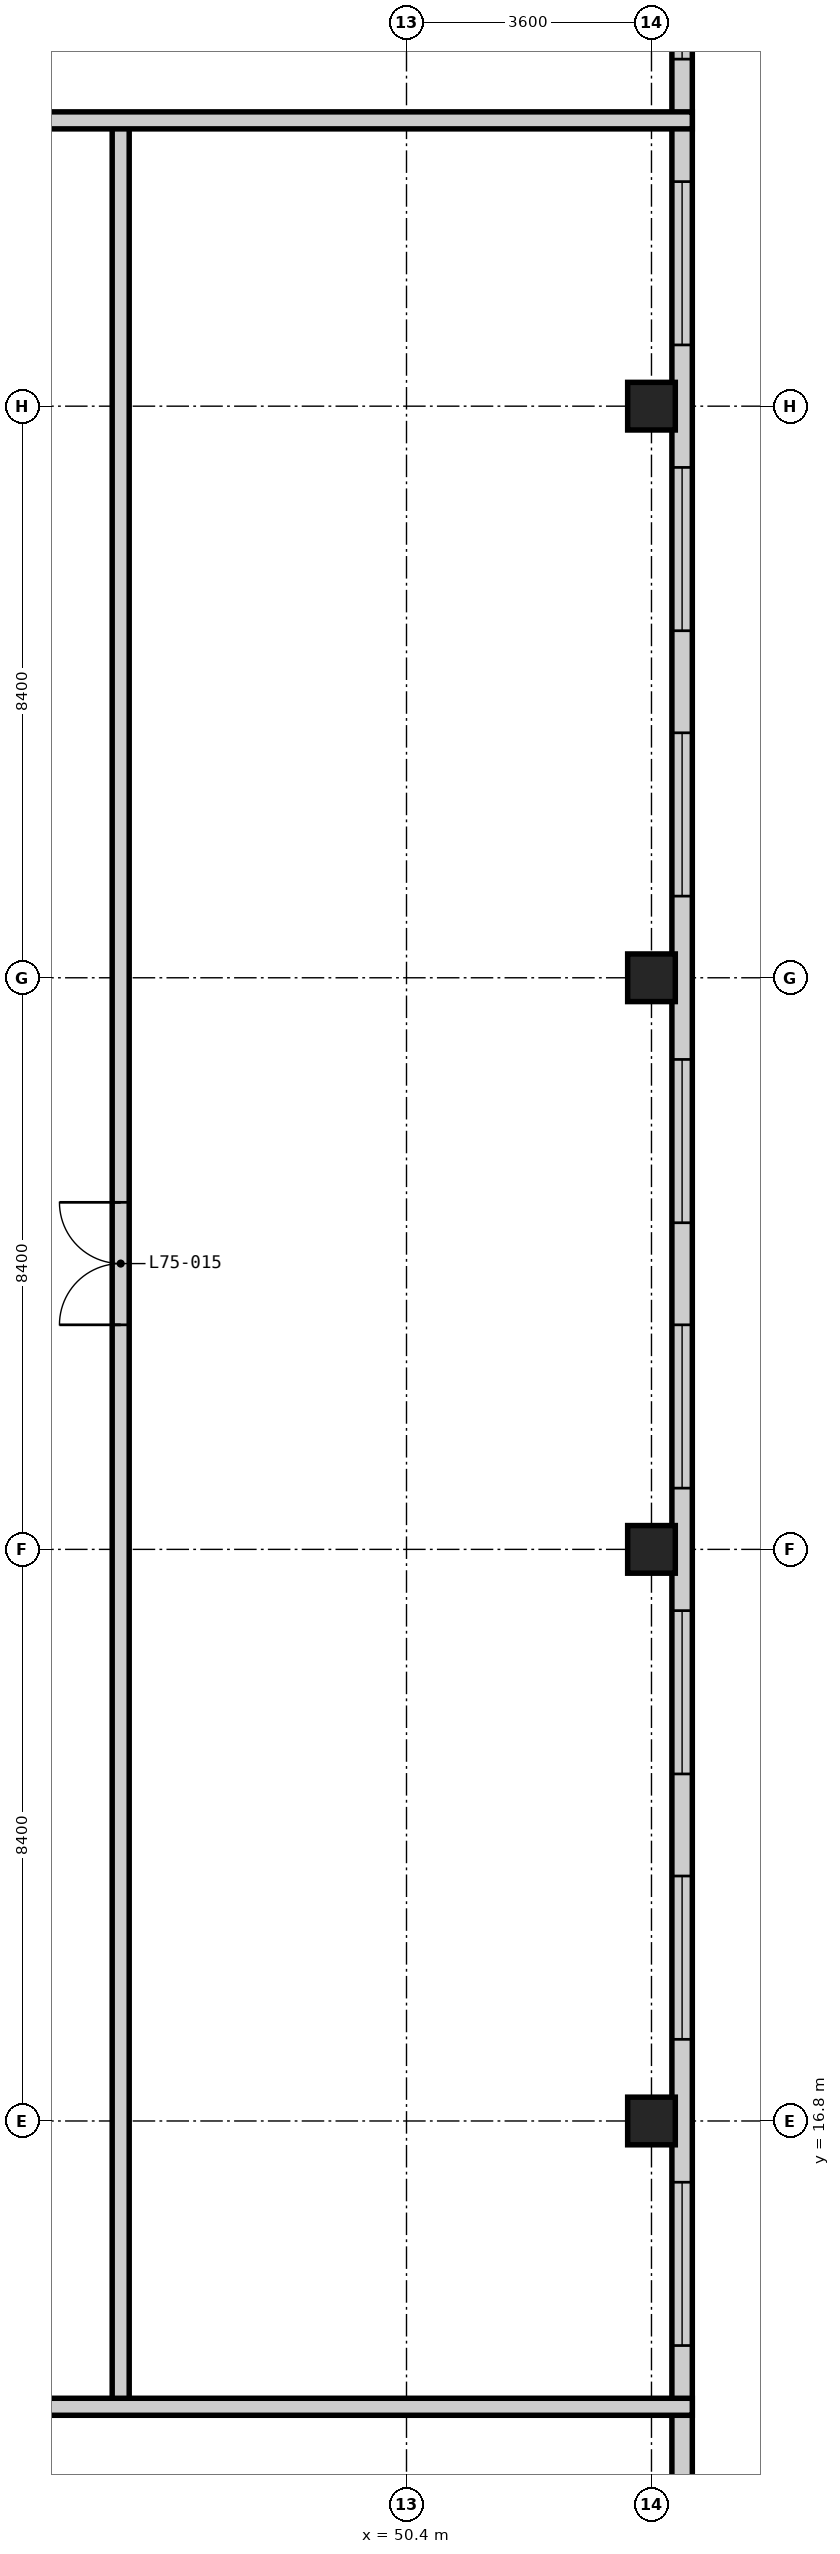
"""IFC4 building model, lengths in metres.
Left out: names, types, materials, properties, quantities, classifications, styles, units other than length and angle.
Written with IfcOpenShell. Run it as: python <this file> out.ifc"""

import sys

from ifc_helpers import new_model, si_unit, direction, frame, frame_2d, origin, origin_2d, place, context, subcontext, project, spatial, polyline, rectangle, hollow_rectangle, outline, extrude, element, fill, save


model = new_model("IFC4")
c1 = context("Model", 3, precision=1e-05, world=origin(), true_north=direction((0.0, 1.0)))
c2 = subcontext(c1, "Body", "Model", "MODEL_VIEW")
j1 = project(units=[si_unit("LENGTHUNIT", "METRE"), si_unit("PLANEANGLEUNIT", "RADIAN")], contexts=[c1])
p1 = place(None, origin())
s1 = spatial("IfcSite", under=j1, at=p1, CompositionType="ELEMENT")
p2 = place(p1, origin())
s2 = spatial("IfcBuilding", under=s1, at=p2, CompositionType="ELEMENT")
p3 = place(p2, frame((0.0, 0.0, 293.6)))
s3 = spatial("IfcBuildingStorey", under=s2, at=p3, CompositionType="ELEMENT", Elevation=293.6)
for number, where, z_axis, x_axis in (
    (1, (54.0, 16.8, -0.35), (0.0, 0.0, 1.0), (1.0, 0.0, 0.0)),
    (2, (54.0, 25.2, -0.35), (0.0, 0.0, 1.0), (1.0, 0.0, 0.0)),
    (3, (54.0, 33.6, -0.35), (0.0, 0.0, 1.0), (1.0, 0.0, 0.0)),
    (4, (54.0, 42.0, -0.35), (0.0, 0.0, 1.0), (1.0, 0.0, 0.0)),
):
    element("IfcColumn", number, at=place(p3, frame(where, z_axis=z_axis, x_axis=x_axis)), inside=s3, PredefinedType="COLUMN", context=c2, shape_type="SweptSolid", body=[
        extrude(hollow_rectangle(XDim=0.7, YDim=0.7, WallThickness=0.06, at=origin_2d()), origin(), (0.0, 0.0, 1.0), 14.972),
    ])
p4 = place(p3, frame((54.45, 6.9, 0.0), z_axis=(0.0, 0.0, 1.0), x_axis=(0.0, 1.0, 0.0)))
e5 = element("IfcWall", 5, at=p4, inside=s3, PredefinedType="SOLIDWALL", context=c2, shape_type="SweptSolid", body=[
    extrude(outline(polyline([(0.0, 0.0), (45.0, 0.0), (45.0, 15.455), (0.0, 15.455), (0.0, 0.0)])), frame((0.0, 0.15, 0.0), z_axis=(0.0, -1.0, 0.0), x_axis=(1.0, 0.0, 0.0)), (0.0, 0.0, 1.0), 0.3),
])
p5 = place(p4, frame((0.9, 0.0, 0.6)))
e6 = element("IfcOpeningElement", 6, at=p5, cuts=e5, PredefinedType="OPENING", context=c2, shape_type="SweptSolid", body=[
    extrude(rectangle(XDim=2.4, YDim=1.5, at=frame_2d((1.2, 0.75))), frame((0.0, 0.16, 0.0), z_axis=(0.0, -1.0, 0.0), x_axis=(1.0, 0.0, 0.0)), (0.0, 0.0, 1.0), 0.32),
])
p6 = place(p4, frame((6.6, 0.0, 0.6)))
e7 = element("IfcOpeningElement", 7, at=p6, cuts=e5, PredefinedType="OPENING", context=c2, shape_type="SweptSolid", body=[
    extrude(rectangle(XDim=2.4, YDim=1.5, at=frame_2d((1.2, 0.75))), frame((0.0, 0.16, 0.0), z_axis=(0.0, -1.0, 0.0), x_axis=(1.0, 0.0, 0.0)), (0.0, 0.0, 1.0), 0.32),
])
p7 = place(p4, frame((11.1, 0.0, 0.6)))
e8 = element("IfcOpeningElement", 8, at=p7, cuts=e5, PredefinedType="OPENING", context=c2, shape_type="SweptSolid", body=[
    extrude(rectangle(XDim=2.4, YDim=1.5, at=frame_2d((1.2, 0.75))), frame((0.0, 0.16, 0.0), z_axis=(0.0, -1.0, 0.0), x_axis=(1.0, 0.0, 0.0)), (0.0, 0.0, 1.0), 0.32),
])
p8 = place(p4, frame((15.0, 0.0, 0.6)))
e9 = element("IfcOpeningElement", 9, at=p8, cuts=e5, PredefinedType="OPENING", context=c2, shape_type="SweptSolid", body=[
    extrude(rectangle(XDim=2.4, YDim=1.5, at=frame_2d((1.2, 0.75))), frame((0.0, 0.16, 0.0), z_axis=(0.0, -1.0, 0.0), x_axis=(1.0, 0.0, 0.0)), (0.0, 0.0, 1.0), 0.32),
])
p9 = place(p4, frame((19.2, 0.0, 0.6)))
e10 = element("IfcOpeningElement", 10, at=p9, cuts=e5, PredefinedType="OPENING", context=c2, shape_type="SweptSolid", body=[
    extrude(rectangle(XDim=2.4, YDim=1.5, at=frame_2d((1.2, 0.75))), frame((0.0, 0.16, 0.0), z_axis=(0.0, -1.0, 0.0), x_axis=(1.0, 0.0, 0.0)), (0.0, 0.0, 1.0), 0.32),
])
p10 = place(p4, frame((23.1, 0.0, 0.6)))
e11 = element("IfcOpeningElement", 11, at=p10, cuts=e5, PredefinedType="OPENING", context=c2, shape_type="SweptSolid", body=[
    extrude(rectangle(XDim=2.4, YDim=1.5, at=frame_2d((1.2, 0.75))), frame((0.0, 0.16, 0.0), z_axis=(0.0, -1.0, 0.0), x_axis=(1.0, 0.0, 0.0)), (0.0, 0.0, 1.0), 0.32),
])
p11 = place(p4, frame((27.9, 0.0, 0.6)))
e12 = element("IfcOpeningElement", 12, at=p11, cuts=e5, PredefinedType="OPENING", context=c2, shape_type="SweptSolid", body=[
    extrude(rectangle(XDim=2.4, YDim=1.5, at=frame_2d((1.2, 0.75))), frame((0.0, 0.16, 0.0), z_axis=(0.0, -1.0, 0.0), x_axis=(1.0, 0.0, 0.0)), (0.0, 0.0, 1.0), 0.32),
])
p12 = place(p4, frame((31.8, 0.0, 0.6)))
e13 = element("IfcOpeningElement", 13, at=p12, cuts=e5, PredefinedType="OPENING", context=c2, shape_type="SweptSolid", body=[
    extrude(rectangle(XDim=2.4, YDim=1.5, at=frame_2d((1.2, 0.75))), frame((0.0, 0.16, 0.0), z_axis=(0.0, -1.0, 0.0), x_axis=(1.0, 0.0, 0.0)), (0.0, 0.0, 1.0), 0.32),
])
p13 = place(p4, frame((36.0, 0.0, 0.6)))
e14 = element("IfcOpeningElement", 14, at=p13, cuts=e5, PredefinedType="OPENING", context=c2, shape_type="SweptSolid", body=[
    extrude(rectangle(XDim=2.4, YDim=1.5, at=frame_2d((1.2, 0.75))), frame((0.0, 0.16, 0.0), z_axis=(0.0, -1.0, 0.0), x_axis=(1.0, 0.0, 0.0)), (0.0, 0.0, 1.0), 0.32),
])
p14 = place(p4, frame((40.2, 0.0, 0.6)))
e15 = element("IfcOpeningElement", 15, at=p14, cuts=e5, PredefinedType="OPENING", context=c2, shape_type="SweptSolid", body=[
    extrude(rectangle(XDim=2.4, YDim=1.5, at=frame_2d((1.2, 0.75))), frame((0.0, 0.16, 0.0), z_axis=(0.0, -1.0, 0.0), x_axis=(1.0, 0.0, 0.0)), (0.0, 0.0, 1.0), 0.32),
])
p15 = place(p3, frame((46.2, 12.6, 0.0), z_axis=(0.0, 0.0, 1.0), x_axis=(0.0, 1.0, 0.0)))
e16 = element("IfcWall", 16, at=p15, inside=s3, PredefinedType="PARTITIONING", context=c2, shape_type="SweptSolid", body=[
    extrude(outline(polyline([(0.0, 0.0), (33.6, 0.0), (33.6, 13.244), (0.0, 13.244), (0.0, 0.0)])), frame((0.0, 0.125, 0.0), z_axis=(0.0, -1.0, 0.0), x_axis=(1.0, 0.0, 0.0)), (0.0, 0.0, 1.0), 0.25),
])
p16 = place(p15, frame((15.9, 0.0, 0.0)))
e17 = element("IfcOpeningElement", 17, at=p16, cuts=e16, PredefinedType="OPENING", context=c2, shape_type="SweptSolid", body=[
    extrude(rectangle(XDim=1.8, YDim=2.4, at=frame_2d((0.9, 1.2))), frame((0.0, 0.135, 0.0), z_axis=(0.0, -1.0, 0.0), x_axis=(1.0, 0.0, 0.0)), (0.0, 0.0, 1.0), 0.27),
])
p17 = place(p3, frame((25.2, 12.6, 0.0), z_axis=(0.0, 0.0, 1.0), x_axis=(1.0, 0.0, 0.0)))
e18 = element("IfcWall", 18, at=p17, inside=s3, PredefinedType="PARTITIONING", context=c2, shape_type="SweptSolid", body=[
    extrude(outline(polyline([(0.0, 0.0), (29.4, 0.0), (29.4, 15.495), (0.0, 7.617), (0.0, 0.0)])), frame((0.0, 0.125, 0.0), z_axis=(0.0, -1.0, 0.0), x_axis=(1.0, 0.0, 0.0)), (0.0, 0.0, 1.0), 0.25),
])
p18 = place(p17, frame((9.6, 0.0, 0.0)))
e19 = element("IfcOpeningElement", 19, at=p18, cuts=e18, PredefinedType="OPENING", context=c2, shape_type="SweptSolid", body=[
    extrude(rectangle(XDim=1.8, YDim=2.4, at=frame_2d((0.9, 1.2))), frame((0.0, 0.135, 0.0), z_axis=(0.0, -1.0, 0.0), x_axis=(1.0, 0.0, 0.0)), (0.0, 0.0, 1.0), 0.27),
])
p19 = place(p3, frame((25.2, 46.2, 0.0), z_axis=(0.0, 0.0, 1.0), x_axis=(1.0, 0.0, 0.0)))
e20 = element("IfcWall", 20, at=p19, inside=s3, PredefinedType="PARTITIONING", context=c2, shape_type="SweptSolid", body=[
    extrude(outline(polyline([(0.0, 0.0), (29.4, 0.0), (29.4, 15.495), (0.0, 7.617), (0.0, 0.0)])), frame((0.0, 0.125, 0.0), z_axis=(0.0, -1.0, 0.0), x_axis=(1.0, 0.0, 0.0)), (0.0, 0.0, 1.0), 0.25),
])
p20 = place(p19, frame((9.6, 0.0, 0.0)))
e21 = element("IfcOpeningElement", 21, at=p20, cuts=e20, PredefinedType="OPENING", context=c2, shape_type="SweptSolid", body=[
    extrude(rectangle(XDim=1.8, YDim=2.4, at=frame_2d((0.9, 1.2))), frame((0.0, 0.135, 0.0), z_axis=(0.0, -1.0, 0.0), x_axis=(1.0, 0.0, 0.0)), (0.0, 0.0, 1.0), 0.27),
])
p21 = place(p6, origin())
e22 = element("IfcWindow", 22, at=p21, inside=s3, PartitioningType="SINGLE_PANEL", PredefinedType="WINDOW", context=c2, shape_type="SweptSolid", body=[
    extrude(rectangle(XDim=2.4, YDim=1.5, at=frame_2d((1.2, 0.75))), frame((0.0, 0.03, 0.0), z_axis=(0.0, -1.0, 0.0), x_axis=(1.0, 0.0, 0.0)), (0.0, 0.0, 1.0), 0.06),
])
fill(e7, e22)
p22 = place(p7, origin())
e23 = element("IfcWindow", 23, at=p22, inside=s3, PartitioningType="SINGLE_PANEL", PredefinedType="WINDOW", context=c2, shape_type="SweptSolid", body=[
    extrude(rectangle(XDim=2.4, YDim=1.5, at=frame_2d((1.2, 0.75))), frame((0.0, 0.03, 0.0), z_axis=(0.0, -1.0, 0.0), x_axis=(1.0, 0.0, 0.0)), (0.0, 0.0, 1.0), 0.06),
])
fill(e8, e23)
p23 = place(p8, origin())
e24 = element("IfcWindow", 24, at=p23, inside=s3, PartitioningType="SINGLE_PANEL", PredefinedType="WINDOW", context=c2, shape_type="SweptSolid", body=[
    extrude(rectangle(XDim=2.4, YDim=1.5, at=frame_2d((1.2, 0.75))), frame((0.0, 0.03, 0.0), z_axis=(0.0, -1.0, 0.0), x_axis=(1.0, 0.0, 0.0)), (0.0, 0.0, 1.0), 0.06),
])
fill(e9, e24)
p24 = place(p9, origin())
e25 = element("IfcWindow", 25, at=p24, inside=s3, PartitioningType="SINGLE_PANEL", PredefinedType="WINDOW", context=c2, shape_type="SweptSolid", body=[
    extrude(rectangle(XDim=2.4, YDim=1.5, at=frame_2d((1.2, 0.75))), frame((0.0, 0.03, 0.0), z_axis=(0.0, -1.0, 0.0), x_axis=(1.0, 0.0, 0.0)), (0.0, 0.0, 1.0), 0.06),
])
fill(e10, e25)
p25 = place(p10, origin())
e26 = element("IfcWindow", 26, at=p25, inside=s3, PartitioningType="SINGLE_PANEL", PredefinedType="WINDOW", context=c2, shape_type="SweptSolid", body=[
    extrude(rectangle(XDim=2.4, YDim=1.5, at=frame_2d((1.2, 0.75))), frame((0.0, 0.03, 0.0), z_axis=(0.0, -1.0, 0.0), x_axis=(1.0, 0.0, 0.0)), (0.0, 0.0, 1.0), 0.06),
])
fill(e11, e26)
p26 = place(p11, origin())
e27 = element("IfcWindow", 27, at=p26, inside=s3, PartitioningType="SINGLE_PANEL", PredefinedType="WINDOW", context=c2, shape_type="SweptSolid", body=[
    extrude(rectangle(XDim=2.4, YDim=1.5, at=frame_2d((1.2, 0.75))), frame((0.0, 0.03, 0.0), z_axis=(0.0, -1.0, 0.0), x_axis=(1.0, 0.0, 0.0)), (0.0, 0.0, 1.0), 0.06),
])
fill(e12, e27)
p27 = place(p12, origin())
e28 = element("IfcWindow", 28, at=p27, inside=s3, PartitioningType="SINGLE_PANEL", PredefinedType="WINDOW", context=c2, shape_type="SweptSolid", body=[
    extrude(rectangle(XDim=2.4, YDim=1.5, at=frame_2d((1.2, 0.75))), frame((0.0, 0.03, 0.0), z_axis=(0.0, -1.0, 0.0), x_axis=(1.0, 0.0, 0.0)), (0.0, 0.0, 1.0), 0.06),
])
fill(e13, e28)
p28 = place(p13, origin())
e29 = element("IfcWindow", 29, at=p28, inside=s3, PartitioningType="SINGLE_PANEL", PredefinedType="WINDOW", context=c2, shape_type="SweptSolid", body=[
    extrude(rectangle(XDim=2.4, YDim=1.5, at=frame_2d((1.2, 0.75))), frame((0.0, 0.03, 0.0), z_axis=(0.0, -1.0, 0.0), x_axis=(1.0, 0.0, 0.0)), (0.0, 0.0, 1.0), 0.06),
])
fill(e14, e29)
p29 = place(p14, origin())
e30 = element("IfcWindow", 30, at=p29, inside=s3, PartitioningType="SINGLE_PANEL", PredefinedType="WINDOW", context=c2, shape_type="SweptSolid", body=[
    extrude(rectangle(XDim=2.4, YDim=1.5, at=frame_2d((1.2, 0.75))), frame((0.0, 0.03, 0.0), z_axis=(0.0, -1.0, 0.0), x_axis=(1.0, 0.0, 0.0)), (0.0, 0.0, 1.0), 0.06),
])
fill(e15, e30)
p30 = place(p16, origin())
e31 = element("IfcDoor", 31, at=p30, inside=s3, OperationType="DOUBLE_DOOR_DOUBLE_SWING", PredefinedType="DOOR", context=c2, shape_type="SweptSolid", body=[
    extrude(rectangle(XDim=1.8, YDim=2.4, at=frame_2d((0.9, 1.2))), frame((0.0, 0.025, 0.0), z_axis=(0.0, -1.0, 0.0), x_axis=(1.0, 0.0, 0.0)), (0.0, 0.0, 1.0), 0.05),
])
fill(e17, e31)
save(model, sys.argv[1])
